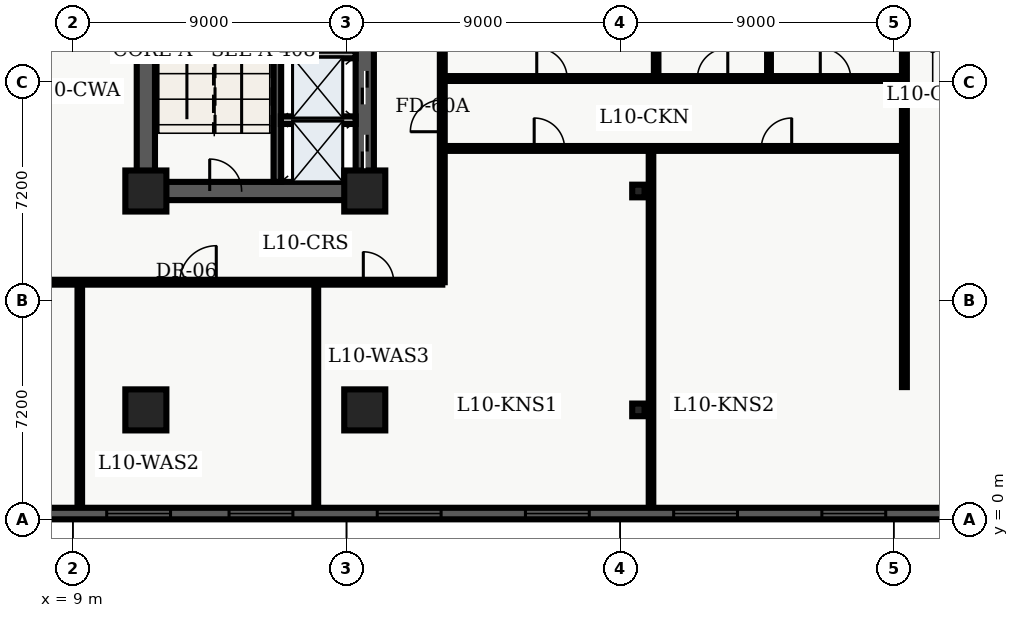
"""IFC4 building model, lengths in metres.
Left out: names, types, materials, properties, quantities, classifications, styles, units other than length and angle.
Written with IfcOpenShell. Run it as: python <this file> out.ifc"""

import sys

from ifc_helpers import new_model, entity, si_unit, converted_unit, direction, frame, origin_with_axes, origin_2d_with_axis, place, context, subcontext, project, spatial, polyline, rectangle, i_section, outline, extrude, element, fill, save


model = new_model("IFC4")
c1 = context("Model", 3, precision=1e-05, world=origin_with_axes(), true_north=direction((0.0, 1.0)))
c2 = subcontext(c1, "Body", "Model", "MODEL_VIEW")
j1 = project(units=[si_unit("LENGTHUNIT", "METRE"), converted_unit("PLANEANGLEUNIT", "DEGREE", entity("IfcPlaneAngleMeasure", 0.017), si_unit("PLANEANGLEUNIT", "RADIAN"), dimensions=[0, 0, 0, 0, 0, 0, 0])], contexts=[c1])
p1 = place(None, origin_with_axes())
s1 = spatial("IfcSite", under=j1, at=p1, CompositionType="ELEMENT")
p2 = place(p1, origin_with_axes())
s2 = spatial("IfcBuilding", under=s1, at=p2, CompositionType="ELEMENT")
p3 = place(p2, frame((0.0, 0.0, 44.4), z_axis=(0.0, 0.0, 1.0), x_axis=(1.0, 0.0, 0.0)))
s3 = spatial("IfcBuildingStorey", under=s2, at=p3, CompositionType="ELEMENT", Elevation=44.4)
p4 = place(p3, frame((11.4, 10.8, 0.0), z_axis=(0.0, 0.0, 1.0), x_axis=(0.0, 1.0, 0.0)))
e1 = element("IfcWall", 1, at=p4, inside=s3, PredefinedType="SHEAR", context=c2, shape_type="SweptSolid", body=[
    extrude(outline(polyline([(0.0, -0.3), (27.0, -0.3), (27.0, 0.3), (0.0, 0.3), (0.0, -0.3)])), origin_with_axes(), (0.0, 0.0, 1.0), 3.66),
])
p5 = place(p3, frame((11.4, 10.8, 0.0), z_axis=(0.0, 0.0, 1.0), x_axis=(1.0, 0.0, 0.0)))
e2 = element("IfcWall", 2, at=p5, inside=s3, PredefinedType="SHEAR", context=c2, shape_type="SweptSolid", body=[
    extrude(outline(polyline([(0.0, -0.3), (7.2, -0.3), (7.2, 0.3), (0.0, 0.3), (0.0, -0.3)])), origin_with_axes(), (0.0, 0.0, 1.0), 3.66),
])
p6 = place(p5, frame((2.625, 0.0, 0.0), z_axis=(0.0, 0.0, 1.0), x_axis=(1.0, 0.0, 0.0)))
e3 = element("IfcOpeningElement", 3, at=p6, cuts=e2, PredefinedType="OPENING", context=c2, shape_type="SweptSolid", body=[
    extrude(rectangle(XDim=1.05, YDim=0.62, at=origin_2d_with_axis()), origin_with_axes(), (0.0, 0.0, 1.0), 2.15),
])
p7 = place(p3, frame((18.6, 10.8, 0.0), z_axis=(0.0, 0.0, 1.0), x_axis=(0.0, 1.0, 0.0)))
e4 = element("IfcWall", 4, at=p7, inside=s3, PredefinedType="SHEAR", context=c2, shape_type="SweptSolid", body=[
    extrude(outline(polyline([(0.0, -0.3), (13.5, -0.3), (13.5, 0.3), (0.0, 0.3), (0.0, -0.3)])), origin_with_axes(), (0.0, 0.0, 1.0), 3.66),
])
p8 = place(p7, frame((1.3, 0.0, 0.0), z_axis=(0.0, 0.0, 1.0), x_axis=(1.0, 0.0, 0.0)))
e5 = element("IfcOpeningElement", 5, at=p8, cuts=e4, PredefinedType="OPENING", context=c2, shape_type="SweptSolid", body=[
    extrude(rectangle(XDim=1.1, YDim=0.62, at=origin_2d_with_axis()), origin_with_axes(), (0.0, 0.0, 1.0), 2.15),
])
p9 = place(p7, frame((3.4, 0.0, 0.0), z_axis=(0.0, 0.0, 1.0), x_axis=(1.0, 0.0, 0.0)))
e6 = element("IfcOpeningElement", 6, at=p9, cuts=e4, PredefinedType="OPENING", context=c2, shape_type="SweptSolid", body=[
    extrude(rectangle(XDim=1.1, YDim=0.62, at=origin_2d_with_axis()), origin_with_axes(), (0.0, 0.0, 1.0), 2.15),
])
p10 = place(p7, frame((11.125, 0.0, 0.0), z_axis=(0.0, 0.0, 1.0), x_axis=(1.0, 0.0, 0.0)))
e7 = element("IfcOpeningElement", 7, at=p10, cuts=e4, PredefinedType="OPENING", context=c2, shape_type="SweptSolid", body=[
    extrude(rectangle(XDim=1.05, YDim=0.62, at=origin_2d_with_axis()), origin_with_axes(), (0.0, 0.0, 1.0), 2.15),
])
p11 = place(p3, frame((15.725, 11.1, 0.0), z_axis=(0.0, 0.0, 1.0), x_axis=(0.0, 1.0, 0.0)))
e8 = element("IfcWall", 8, at=p11, inside=s3, PredefinedType="SHEAR", context=c2, shape_type="SweptSolid", body=[
    extrude(outline(polyline([(0.0, -0.125), (8.6, -0.125), (8.6, 0.125), (0.0, 0.125), (0.0, -0.125)])), origin_with_axes(), (0.0, 0.0, 1.0), 3.66),
])
for number, where, z_axis, x_axis in (
    (9, (11.4, 3.6, 0.0), (0.0, 0.0, 1.0), (1.0, 0.0, 0.0)),
    (10, (11.4, 10.8, 0.0), (0.0, 0.0, 1.0), (1.0, 0.0, 0.0)),
    (11, (18.6, 3.6, 0.0), (0.0, 0.0, 1.0), (1.0, 0.0, 0.0)),
    (12, (18.6, 10.8, 0.0), (0.0, 0.0, 1.0), (1.0, 0.0, 0.0)),
):
    element("IfcColumn", number, at=place(p3, frame(where, z_axis=z_axis, x_axis=x_axis)), inside=s3, PredefinedType="COLUMN", context=c2, shape_type="SweptSolid", body=[
        extrude(rectangle(XDim=1.35, YDim=1.35, at=origin_2d_with_axis()), origin_with_axes(), (0.0, 0.0, 1.0), 3.9),
    ])
for number, where, z_axis, x_axis in (
    (13, (27.6, 3.6, 0.0), (0.0, 0.0, 1.0), (1.0, 0.0, 0.0)),
    (14, (27.6, 10.8, 0.0), (0.0, 0.0, 1.0), (1.0, 0.0, 0.0)),
):
    element("IfcColumn", number, at=place(p3, frame(where, z_axis=z_axis, x_axis=x_axis)), inside=s3, PredefinedType="COLUMN", context=c2, shape_type="SweptSolid", body=[
        extrude(i_section(OverallWidth=0.406, OverallDepth=0.416, WebThickness=0.03, FlangeThickness=0.048, FilletRadius=0.022, at=origin_2d_with_axis()), origin_with_axes(), (0.0, 0.0, 1.0), 3.9),
    ])
for number, where, z_axis, x_axis in (
    (15, (15.84, 13.13, 0.0), (0.0, 0.0, 1.0), (1.0, 0.0, 0.0)),
    (16, (15.84, 15.29, 0.0), (0.0, 0.0, 1.0), (1.0, 0.0, 0.0)),
):
    element("IfcWall", number, at=place(p3, frame(where, z_axis=z_axis, x_axis=x_axis)), inside=s3, PredefinedType="SOLIDWALL", context=c2, shape_type="SweptSolid", body=[
        extrude(outline(polyline([(0.0, -0.125), (2.46, -0.125), (2.46, 0.125), (0.0, 0.125), (0.0, -0.125)])), origin_with_axes(), (0.0, 0.0, 1.0), 2.7),
    ])
p12 = place(p3, frame((2.6, 7.8, 0.0), z_axis=(0.0, 0.0, 1.0), x_axis=(1.0, 0.0, 0.0)))
e17 = element("IfcWall", 17, at=p12, inside=s3, PredefinedType="PARTITIONING", context=c2, shape_type="SweptSolid", body=[
    extrude(outline(polyline([(0.0, -0.08), (18.55, -0.08), (18.55, 0.08), (0.0, 0.08), (0.0, -0.08)])), origin_with_axes(), (0.0, 0.0, 1.0), 2.7),
])
p13 = place(p12, frame((2.059, 0.0, 0.0), z_axis=(0.0, 0.0, 1.0), x_axis=(1.0, 0.0, 0.0)))
e18 = element("IfcOpeningElement", 18, at=p13, cuts=e17, PredefinedType="OPENING", context=c2, shape_type="SweptSolid", body=[
    extrude(rectangle(XDim=1.0, YDim=0.18, at=origin_2d_with_axis()), origin_with_axes(), (0.0, 0.0, 1.0), 2.15),
])
p14 = place(p12, frame((10.516, 0.0, 0.0), z_axis=(0.0, 0.0, 1.0), x_axis=(1.0, 0.0, 0.0)))
e19 = element("IfcOpeningElement", 19, at=p14, cuts=e17, PredefinedType="OPENING", context=c2, shape_type="SweptSolid", body=[
    extrude(rectangle(XDim=1.2, YDim=0.18, at=origin_2d_with_axis()), origin_with_axes(), (0.0, 0.0, 1.0), 2.2),
])
p15 = place(p12, frame((16.453, 0.0, 0.0), z_axis=(0.0, 0.0, 1.0), x_axis=(1.0, 0.0, 0.0)))
e20 = element("IfcOpeningElement", 20, at=p15, cuts=e17, PredefinedType="OPENING", context=c2, shape_type="SweptSolid", body=[
    extrude(rectangle(XDim=1.0, YDim=0.18, at=origin_2d_with_axis()), origin_with_axes(), (0.0, 0.0, 1.0), 2.15),
])
p16 = place(p3, frame((21.15, 7.8, 0.0), z_axis=(0.0, 0.0, 1.0), x_axis=(0.0, 1.0, 0.0)))
e21 = element("IfcWall", 21, at=p16, inside=s3, PredefinedType="PARTITIONING", context=c2, shape_type="SweptSolid", body=[
    extrude(outline(polyline([(0.0, -0.08), (32.7, -0.08), (32.7, 0.08), (0.0, 0.08), (0.0, -0.08)])), origin_with_axes(), (0.0, 0.0, 1.0), 2.7),
])
p17 = place(p16, frame((5.475, 0.0, 0.0), z_axis=(0.0, 0.0, 1.0), x_axis=(1.0, 0.0, 0.0)))
e22 = element("IfcOpeningElement", 22, at=p17, cuts=e21, PredefinedType="OPENING", context=c2, shape_type="SweptSolid", body=[
    extrude(rectangle(XDim=1.05, YDim=0.18, at=origin_2d_with_axis()), origin_with_axes(), (0.0, 0.0, 1.0), 2.15),
])
p18 = place(p3, frame((9.227, 0.36, 0.0), z_axis=(0.0, 0.0, 1.0), x_axis=(0.0, 1.0, 0.0)))
e23 = element("IfcWall", 23, at=p18, inside=s3, PredefinedType="PARTITIONING", context=c2, shape_type="SweptSolid", body=[
    extrude(outline(polyline([(0.0, -0.075), (7.34, -0.075), (7.34, 0.075), (0.0, 0.075), (0.0, -0.075)])), origin_with_axes(), (0.0, 0.0, 1.0), 2.7),
])
p19 = place(p3, frame((17.005, 0.36, 0.0), z_axis=(0.0, 0.0, 1.0), x_axis=(0.0, 1.0, 0.0)))
e24 = element("IfcWall", 24, at=p19, inside=s3, PredefinedType="PARTITIONING", context=c2, shape_type="SweptSolid", body=[
    extrude(outline(polyline([(0.0, -0.062), (7.34, -0.062), (7.34, 0.062), (0.0, 0.062), (0.0, -0.062)])), origin_with_axes(), (0.0, 0.0, 1.0), 2.7),
])
p20 = place(p3, frame((21.15, 12.2, 0.0), z_axis=(0.0, 0.0, 1.0), x_axis=(1.0, 0.0, 0.0)))
e25 = element("IfcWall", 25, at=p20, inside=s3, PredefinedType="PARTITIONING", context=c2, shape_type="SweptSolid", body=[
    extrude(outline(polyline([(0.0, -0.08), (15.2, -0.08), (15.2, 0.08), (0.0, 0.08), (0.0, -0.08)])), origin_with_axes(), (0.0, 0.0, 1.0), 2.7),
])
p21 = place(p20, frame((3.522, 0.0, 0.0), z_axis=(0.0, 0.0, 1.0), x_axis=(1.0, 0.0, 0.0)))
e26 = element("IfcOpeningElement", 26, at=p21, cuts=e25, PredefinedType="OPENING", context=c2, shape_type="SweptSolid", body=[
    extrude(rectangle(XDim=1.0, YDim=0.18, at=origin_2d_with_axis()), origin_with_axes(), (0.0, 0.0, 1.0), 2.15),
])
p22 = place(p20, frame((10.992, 0.0, 0.0), z_axis=(0.0, 0.0, 1.0), x_axis=(1.0, 0.0, 0.0)))
e27 = element("IfcOpeningElement", 27, at=p22, cuts=e25, PredefinedType="OPENING", context=c2, shape_type="SweptSolid", body=[
    extrude(rectangle(XDim=1.0, YDim=0.18, at=origin_2d_with_axis()), origin_with_axes(), (0.0, 0.0, 1.0), 2.15),
])
p23 = place(p3, frame((21.15, 14.5, 0.0), z_axis=(0.0, 0.0, 1.0), x_axis=(1.0, 0.0, 0.0)))
e28 = element("IfcWall", 28, at=p23, inside=s3, PredefinedType="PARTITIONING", context=c2, shape_type="SweptSolid", body=[
    extrude(outline(polyline([(0.0, -0.08), (15.2, -0.08), (15.2, 0.08), (0.0, 0.08), (0.0, -0.08)])), origin_with_axes(), (0.0, 0.0, 1.0), 2.7),
])
p24 = place(p23, frame((3.607, 0.0, 0.0), z_axis=(0.0, 0.0, 1.0), x_axis=(1.0, 0.0, 0.0)))
e29 = element("IfcOpeningElement", 29, at=p24, cuts=e28, PredefinedType="OPENING", context=c2, shape_type="SweptSolid", body=[
    extrude(rectangle(XDim=1.0, YDim=0.18, at=origin_2d_with_axis()), origin_with_axes(), (0.0, 0.0, 1.0), 2.15),
])
p25 = place(p23, frame((8.89, 0.0, 0.0), z_axis=(0.0, 0.0, 1.0), x_axis=(1.0, 0.0, 0.0)))
e30 = element("IfcOpeningElement", 30, at=p25, cuts=e28, PredefinedType="OPENING", context=c2, shape_type="SweptSolid", body=[
    extrude(rectangle(XDim=1.0, YDim=0.18, at=origin_2d_with_axis()), origin_with_axes(), (0.0, 0.0, 1.0), 2.15),
])
p26 = place(p23, frame((12.933, 0.0, 0.0), z_axis=(0.0, 0.0, 1.0), x_axis=(1.0, 0.0, 0.0)))
e31 = element("IfcOpeningElement", 31, at=p26, cuts=e28, PredefinedType="OPENING", context=c2, shape_type="SweptSolid", body=[
    extrude(rectangle(XDim=1.0, YDim=0.18, at=origin_2d_with_axis()), origin_with_axes(), (0.0, 0.0, 1.0), 2.15),
])
p27 = place(p3, frame((36.35, 4.35, 0.0), z_axis=(0.0, 0.0, 1.0), x_axis=(0.0, 1.0, 0.0)))
e32 = element("IfcWall", 32, at=p27, inside=s3, PredefinedType="PARTITIONING", context=c2, shape_type="SweptSolid", body=[
    extrude(outline(polyline([(0.0, -0.08), (16.95, -0.08), (16.95, 0.08), (0.0, 0.08), (0.0, -0.08)])), origin_with_axes(), (0.0, 0.0, 1.0), 2.7),
])
p28 = place(p3, frame((28.015, 0.36, 0.0), z_axis=(0.0, 0.0, 1.0), x_axis=(0.0, 1.0, 0.0)))
e33 = element("IfcWall", 33, at=p28, inside=s3, PredefinedType="PARTITIONING", context=c2, shape_type="SweptSolid", body=[
    extrude(outline(polyline([(0.0, -0.075), (11.72, -0.075), (11.72, 0.075), (0.0, 0.075), (0.0, -0.075)])), origin_with_axes(), (0.0, 0.0, 1.0), 2.7),
])
p29 = place(p3, frame((28.184, 14.62, 0.0), z_axis=(0.0, 0.0, 1.0), x_axis=(0.0, 1.0, 0.0)))
e34 = element("IfcWall", 34, at=p29, inside=s3, PredefinedType="PARTITIONING", context=c2, shape_type="SweptSolid", body=[
    extrude(outline(polyline([(0.0, -0.075), (6.605, -0.075), (6.605, 0.075), (0.0, 0.075), (0.0, -0.075)])), origin_with_axes(), (0.0, 0.0, 1.0), 2.7),
])
p30 = place(p3, frame((31.896, 14.62, 0.0), z_axis=(0.0, 0.0, 1.0), x_axis=(0.0, 1.0, 0.0)))
e35 = element("IfcWall", 35, at=p30, inside=s3, PredefinedType="PARTITIONING", context=c2, shape_type="SweptSolid", body=[
    extrude(outline(polyline([(0.0, -0.062), (6.605, -0.062), (6.605, 0.062), (0.0, 0.062), (0.0, -0.062)])), origin_with_axes(), (0.0, 0.0, 1.0), 2.7),
])
p31 = place(p3, frame((57.22, 0.19, 0.0), z_axis=(0.0, 0.0, 1.0), x_axis=(-1.0, 0.0, 0.0)))
e36 = element("IfcWall", 36, at=p31, inside=s3, PredefinedType="SOLIDWALL", context=c2, shape_type="SweptSolid", body=[
    extrude(outline(polyline([(0.0, -0.19), (54.82, -0.19), (54.82, 0.19), (0.0, 0.19), (0.0, -0.19)])), origin_with_axes(), (0.0, 0.0, 1.0), 3.66),
])
p32 = place(p31, frame((3.037, 0.0, 0.45), z_axis=(0.0, 0.0, 1.0), x_axis=(1.0, 0.0, 0.0)))
e37 = element("IfcOpeningElement", 37, at=p32, cuts=e36, PredefinedType="OPENING", context=c2, shape_type="SweptSolid", body=[
    extrude(rectangle(XDim=2.1, YDim=0.4, at=origin_2d_with_axis()), origin_with_axes(), (0.0, 0.0, 1.0), 2.2),
])
p33 = place(p31, frame((7.912, 0.0, 0.45), z_axis=(0.0, 0.0, 1.0), x_axis=(1.0, 0.0, 0.0)))
e38 = element("IfcOpeningElement", 38, at=p33, cuts=e36, PredefinedType="OPENING", context=c2, shape_type="SweptSolid", body=[
    extrude(rectangle(XDim=2.1, YDim=0.4, at=origin_2d_with_axis()), origin_with_axes(), (0.0, 0.0, 1.0), 2.2),
])
p34 = place(p31, frame((12.786, 0.0, 0.45), z_axis=(0.0, 0.0, 1.0), x_axis=(1.0, 0.0, 0.0)))
e39 = element("IfcOpeningElement", 39, at=p34, cuts=e36, PredefinedType="OPENING", context=c2, shape_type="SweptSolid", body=[
    extrude(rectangle(XDim=2.1, YDim=0.4, at=origin_2d_with_axis()), origin_with_axes(), (0.0, 0.0, 1.0), 2.2),
])
p35 = place(p31, frame((17.661, 0.0, 0.45), z_axis=(0.0, 0.0, 1.0), x_axis=(1.0, 0.0, 0.0)))
e40 = element("IfcOpeningElement", 40, at=p35, cuts=e36, PredefinedType="OPENING", context=c2, shape_type="SweptSolid", body=[
    extrude(rectangle(XDim=2.1, YDim=0.4, at=origin_2d_with_axis()), origin_with_axes(), (0.0, 0.0, 1.0), 2.2),
])
p36 = place(p31, frame((22.535, 0.0, 0.45), z_axis=(0.0, 0.0, 1.0), x_axis=(1.0, 0.0, 0.0)))
e41 = element("IfcOpeningElement", 41, at=p36, cuts=e36, PredefinedType="OPENING", context=c2, shape_type="SweptSolid", body=[
    extrude(rectangle(XDim=2.1, YDim=0.4, at=origin_2d_with_axis()), origin_with_axes(), (0.0, 0.0, 1.0), 2.2),
])
p37 = place(p31, frame((27.41, 0.0, 0.45), z_axis=(0.0, 0.0, 1.0), x_axis=(1.0, 0.0, 0.0)))
e42 = element("IfcOpeningElement", 42, at=p37, cuts=e36, PredefinedType="OPENING", context=c2, shape_type="SweptSolid", body=[
    extrude(rectangle(XDim=2.1, YDim=0.4, at=origin_2d_with_axis()), origin_with_axes(), (0.0, 0.0, 1.0), 2.2),
])
p38 = place(p31, frame((32.285, 0.0, 0.45), z_axis=(0.0, 0.0, 1.0), x_axis=(1.0, 0.0, 0.0)))
e43 = element("IfcOpeningElement", 43, at=p38, cuts=e36, PredefinedType="OPENING", context=c2, shape_type="SweptSolid", body=[
    extrude(rectangle(XDim=2.1, YDim=0.4, at=origin_2d_with_axis()), origin_with_axes(), (0.0, 0.0, 1.0), 2.2),
])
p39 = place(p31, frame((37.159, 0.0, 0.45), z_axis=(0.0, 0.0, 1.0), x_axis=(1.0, 0.0, 0.0)))
e44 = element("IfcOpeningElement", 44, at=p39, cuts=e36, PredefinedType="OPENING", context=c2, shape_type="SweptSolid", body=[
    extrude(rectangle(XDim=2.1, YDim=0.4, at=origin_2d_with_axis()), origin_with_axes(), (0.0, 0.0, 1.0), 2.2),
])
p40 = place(p31, frame((42.034, 0.0, 0.45), z_axis=(0.0, 0.0, 1.0), x_axis=(1.0, 0.0, 0.0)))
e45 = element("IfcOpeningElement", 45, at=p40, cuts=e36, PredefinedType="OPENING", context=c2, shape_type="SweptSolid", body=[
    extrude(rectangle(XDim=2.1, YDim=0.4, at=origin_2d_with_axis()), origin_with_axes(), (0.0, 0.0, 1.0), 2.2),
])
p41 = place(p31, frame((46.058, 0.0, 0.45), z_axis=(0.0, 0.0, 1.0), x_axis=(1.0, 0.0, 0.0)))
e46 = element("IfcOpeningElement", 46, at=p41, cuts=e36, PredefinedType="OPENING", context=c2, shape_type="SweptSolid", body=[
    extrude(rectangle(XDim=2.1, YDim=0.4, at=origin_2d_with_axis()), origin_with_axes(), (0.0, 0.0, 1.0), 2.2),
])
p42 = place(p31, frame((51.783, 0.0, 0.45), z_axis=(0.0, 0.0, 1.0), x_axis=(1.0, 0.0, 0.0)))
e47 = element("IfcOpeningElement", 47, at=p42, cuts=e36, PredefinedType="OPENING", context=c2, shape_type="SweptSolid", body=[
    extrude(rectangle(XDim=2.1, YDim=0.4, at=origin_2d_with_axis()), origin_with_axes(), (0.0, 0.0, 1.0), 2.2),
])
p43 = place(p7, frame((1.3, 0.0, 0.0), z_axis=(0.0, 0.0, 1.0), x_axis=(1.0, 0.0, 0.0)))
e48 = element("IfcDoor", 48, at=p43, inside=s3, OperationType="SLIDING_TO_LEFT", PredefinedType="DOOR", context=c2, shape_type="SweptSolid", body=[
    extrude(rectangle(XDim=1.1, YDim=0.09, at=origin_2d_with_axis()), origin_with_axes(), (0.0, 0.0, 1.0), 2.15),
])
fill(e5, e48)
p44 = place(p7, frame((3.4, 0.0, 0.0), z_axis=(0.0, 0.0, 1.0), x_axis=(1.0, 0.0, 0.0)))
e49 = element("IfcDoor", 49, at=p44, inside=s3, OperationType="SLIDING_TO_RIGHT", PredefinedType="DOOR", context=c2, shape_type="SweptSolid", body=[
    extrude(rectangle(XDim=1.1, YDim=0.09, at=origin_2d_with_axis()), origin_with_axes(), (0.0, 0.0, 1.0), 2.15),
])
fill(e6, e49)
p45 = place(p5, frame((2.625, 0.0, 0.0), z_axis=(0.0, 0.0, 1.0), x_axis=(1.0, 0.0, 0.0)))
e50 = element("IfcDoor", 50, at=p45, inside=s3, OperationType="SINGLE_SWING_LEFT", PredefinedType="DOOR", context=c2, shape_type="SweptSolid", body=[
    extrude(rectangle(XDim=1.05, YDim=0.09, at=origin_2d_with_axis()), origin_with_axes(), (0.0, 0.0, 1.0), 2.15),
])
fill(e3, e50)
p46 = place(p12, frame((10.516, 0.0, 0.0), z_axis=(0.0, 0.0, 1.0), x_axis=(1.0, 0.0, 0.0)))
e51 = element("IfcDoor", 51, at=p46, inside=s3, OperationType="SINGLE_SWING_RIGHT", PredefinedType="DOOR", context=c2, shape_type="SweptSolid", body=[
    extrude(rectangle(XDim=1.2, YDim=0.09, at=origin_2d_with_axis()), origin_with_axes(), (0.0, 0.0, 1.0), 2.2),
])
fill(e19, e51)
p47 = place(p12, frame((16.453, 0.0, 0.0), z_axis=(0.0, 0.0, 1.0), x_axis=(1.0, 0.0, 0.0)))
e52 = element("IfcDoor", 52, at=p47, inside=s3, OperationType="SINGLE_SWING_LEFT", PredefinedType="DOOR", context=c2, shape_type="SweptSolid", body=[
    extrude(rectangle(XDim=1.0, YDim=0.09, at=origin_2d_with_axis()), origin_with_axes(), (0.0, 0.0, 1.0), 2.15),
])
fill(e20, e52)
p48 = place(p16, frame((5.475, 0.0, 0.0), z_axis=(0.0, 0.0, 1.0), x_axis=(1.0, 0.0, 0.0)))
e53 = element("IfcDoor", 53, at=p48, inside=s3, OperationType="SINGLE_SWING_LEFT", PredefinedType="DOOR", context=c2, shape_type="SweptSolid", body=[
    extrude(rectangle(XDim=1.05, YDim=0.09, at=origin_2d_with_axis()), origin_with_axes(), (0.0, 0.0, 1.0), 2.15),
])
fill(e22, e53)
p49 = place(p20, frame((3.522, 0.0, 0.0), z_axis=(0.0, 0.0, 1.0), x_axis=(1.0, 0.0, 0.0)))
e54 = element("IfcDoor", 54, at=p49, inside=s3, OperationType="SINGLE_SWING_LEFT", PredefinedType="DOOR", context=c2, shape_type="SweptSolid", body=[
    extrude(rectangle(XDim=1.0, YDim=0.09, at=origin_2d_with_axis()), origin_with_axes(), (0.0, 0.0, 1.0), 2.15),
])
fill(e26, e54)
p50 = place(p20, frame((10.992, 0.0, 0.0), z_axis=(0.0, 0.0, 1.0), x_axis=(1.0, 0.0, 0.0)))
e55 = element("IfcDoor", 55, at=p50, inside=s3, OperationType="SINGLE_SWING_RIGHT", PredefinedType="DOOR", context=c2, shape_type="SweptSolid", body=[
    extrude(rectangle(XDim=1.0, YDim=0.09, at=origin_2d_with_axis()), origin_with_axes(), (0.0, 0.0, 1.0), 2.15),
])
fill(e27, e55)
p51 = place(p23, frame((3.607, 0.0, 0.0), z_axis=(0.0, 0.0, 1.0), x_axis=(1.0, 0.0, 0.0)))
e56 = element("IfcDoor", 56, at=p51, inside=s3, OperationType="SINGLE_SWING_LEFT", PredefinedType="DOOR", context=c2, shape_type="SweptSolid", body=[
    extrude(rectangle(XDim=1.0, YDim=0.09, at=origin_2d_with_axis()), origin_with_axes(), (0.0, 0.0, 1.0), 2.15),
])
fill(e29, e56)
p52 = place(p23, frame((8.89, 0.0, 0.0), z_axis=(0.0, 0.0, 1.0), x_axis=(1.0, 0.0, 0.0)))
e57 = element("IfcDoor", 57, at=p52, inside=s3, OperationType="SINGLE_SWING_RIGHT", PredefinedType="DOOR", context=c2, shape_type="SweptSolid", body=[
    extrude(rectangle(XDim=1.0, YDim=0.09, at=origin_2d_with_axis()), origin_with_axes(), (0.0, 0.0, 1.0), 2.15),
])
fill(e30, e57)
p53 = place(p23, frame((12.933, 0.0, 0.0), z_axis=(0.0, 0.0, 1.0), x_axis=(1.0, 0.0, 0.0)))
e58 = element("IfcDoor", 58, at=p53, inside=s3, OperationType="SINGLE_SWING_LEFT", PredefinedType="DOOR", context=c2, shape_type="SweptSolid", body=[
    extrude(rectangle(XDim=1.0, YDim=0.09, at=origin_2d_with_axis()), origin_with_axes(), (0.0, 0.0, 1.0), 2.15),
])
fill(e31, e58)
p54 = place(p31, frame((22.535, 0.0, 0.45), z_axis=(0.0, 0.0, 1.0), x_axis=(1.0, 0.0, 0.0)))
e59 = element("IfcWindow", 59, at=p54, inside=s3, PredefinedType="WINDOW", context=c2, shape_type="SweptSolid", body=[
    extrude(rectangle(XDim=2.1, YDim=0.09, at=origin_2d_with_axis()), origin_with_axes(), (0.0, 0.0, 1.0), 2.2),
])
fill(e41, e59)
p55 = place(p31, frame((27.41, 0.0, 0.45), z_axis=(0.0, 0.0, 1.0), x_axis=(1.0, 0.0, 0.0)))
e60 = element("IfcWindow", 60, at=p55, inside=s3, PredefinedType="WINDOW", context=c2, shape_type="SweptSolid", body=[
    extrude(rectangle(XDim=2.1, YDim=0.09, at=origin_2d_with_axis()), origin_with_axes(), (0.0, 0.0, 1.0), 2.2),
])
fill(e42, e60)
p56 = place(p31, frame((32.285, 0.0, 0.45), z_axis=(0.0, 0.0, 1.0), x_axis=(1.0, 0.0, 0.0)))
e61 = element("IfcWindow", 61, at=p56, inside=s3, PredefinedType="WINDOW", context=c2, shape_type="SweptSolid", body=[
    extrude(rectangle(XDim=2.1, YDim=0.09, at=origin_2d_with_axis()), origin_with_axes(), (0.0, 0.0, 1.0), 2.2),
])
fill(e43, e61)
p57 = place(p31, frame((37.159, 0.0, 0.45), z_axis=(0.0, 0.0, 1.0), x_axis=(1.0, 0.0, 0.0)))
e62 = element("IfcWindow", 62, at=p57, inside=s3, PredefinedType="WINDOW", context=c2, shape_type="SweptSolid", body=[
    extrude(rectangle(XDim=2.1, YDim=0.09, at=origin_2d_with_axis()), origin_with_axes(), (0.0, 0.0, 1.0), 2.2),
])
fill(e44, e62)
p58 = place(p31, frame((42.034, 0.0, 0.45), z_axis=(0.0, 0.0, 1.0), x_axis=(1.0, 0.0, 0.0)))
e63 = element("IfcWindow", 63, at=p58, inside=s3, PredefinedType="WINDOW", context=c2, shape_type="SweptSolid", body=[
    extrude(rectangle(XDim=2.1, YDim=0.09, at=origin_2d_with_axis()), origin_with_axes(), (0.0, 0.0, 1.0), 2.2),
])
fill(e45, e63)
p59 = place(p31, frame((46.058, 0.0, 0.45), z_axis=(0.0, 0.0, 1.0), x_axis=(1.0, 0.0, 0.0)))
e64 = element("IfcWindow", 64, at=p59, inside=s3, PredefinedType="WINDOW", context=c2, shape_type="SweptSolid", body=[
    extrude(rectangle(XDim=2.1, YDim=0.09, at=origin_2d_with_axis()), origin_with_axes(), (0.0, 0.0, 1.0), 2.2),
])
fill(e46, e64)
save(model, sys.argv[1])
